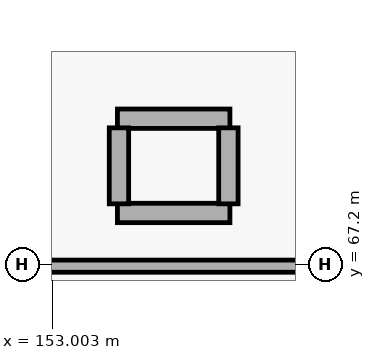
"""IFC4 building model, lengths in metres.
Left out: names, types, materials, properties, quantities, classifications, styles, units other than length and angle.
Written with IfcOpenShell. Run it as: python <this file> out.ifc"""

import sys

from ifc_helpers import new_model, si_unit, direction, frame, frame_2d, origin, place, context, subcontext, project, spatial, rectangle, extrude, element, save


model = new_model("IFC4")
c1 = context("Model", 3, precision=1e-05, world=origin(), true_north=direction((0.0, 1.0)))
c2 = subcontext(c1, "Body", "Model", "MODEL_VIEW")
j1 = project(units=[si_unit("LENGTHUNIT", "METRE"), si_unit("PLANEANGLEUNIT", "RADIAN")], contexts=[c1])
p1 = place(None, origin())
s1 = spatial("IfcSite", under=j1, at=p1, CompositionType="ELEMENT")
p2 = place(p1, origin())
s2 = spatial("IfcBuilding", under=s1, at=p2, CompositionType="ELEMENT")
p3 = place(p2, frame((0.0, 0.0, 20.7)))
s3 = spatial("IfcBuildingStorey", under=s2, at=p3, CompositionType="ELEMENT", Elevation=20.7)
for number, where, z_axis, x_axis in (
    (1, (153.86, 69.12, 0.0), (0.0, 0.0, 1.0), (1.0, 0.0, 0.0)),
    (2, (153.86, 67.88, 0.0), (0.0, 0.0, 1.0), (1.0, 0.0, 0.0)),
):
    element("IfcWall", number, at=place(p3, frame(where, z_axis=z_axis, x_axis=x_axis)), inside=s3, PredefinedType="PARTITIONING", context=c2, shape_type="SweptSolid", body=[
        extrude(rectangle(XDim=1.48, YDim=0.255, at=frame_2d((0.74, 0.0))), origin(), (0.0, 0.0, 1.0), 4.98),
    ])
for number, where, z_axis, x_axis in (
    (3, (153.88, 68.0, 0.0), (0.0, 0.0, 1.0), (0.0, 1.0, 0.0)),
    (4, (155.32, 68.0, 0.0), (0.0, 0.0, 1.0), (0.0, 1.0, 0.0)),
):
    element("IfcWall", number, at=place(p3, frame(where, z_axis=z_axis, x_axis=x_axis)), inside=s3, PredefinedType="PARTITIONING", context=c2, shape_type="SweptSolid", body=[
        extrude(rectangle(XDim=1.0, YDim=0.255, at=frame_2d((0.5, 0.0))), origin(), (0.0, 0.0, 1.0), 4.98),
    ])
p4 = place(p3, frame((142.43, 67.18, 0.0), z_axis=(0.0, 0.0, 1.0), x_axis=(1.0, 0.0, 0.0)))
e5 = element("IfcWall", 5, at=p4, inside=s3, PredefinedType="PARTITIONING", context=c2, shape_type="SweptSolid", body=[
    extrude(rectangle(XDim=23.14, YDim=0.16, at=frame_2d((11.57, 0.0))), origin(), (0.0, 0.0, 1.0), 4.66),
])
p5 = place(p4, frame((2.4, 0.0, 0.0)))
e6 = element("IfcOpeningElement", 6, at=p5, cuts=e5, PredefinedType="OPENING", context=c2, shape_type="SweptSolid", body=[
    extrude(rectangle(XDim=1.8, YDim=2.42, at=frame_2d((0.9, 1.21))), frame((0.0, 0.09, 0.0), z_axis=(0.0, -1.0, 0.0), x_axis=(1.0, 0.0, 0.0)), (0.0, 0.0, 1.0), 0.18),
])
save(model, sys.argv[1])
